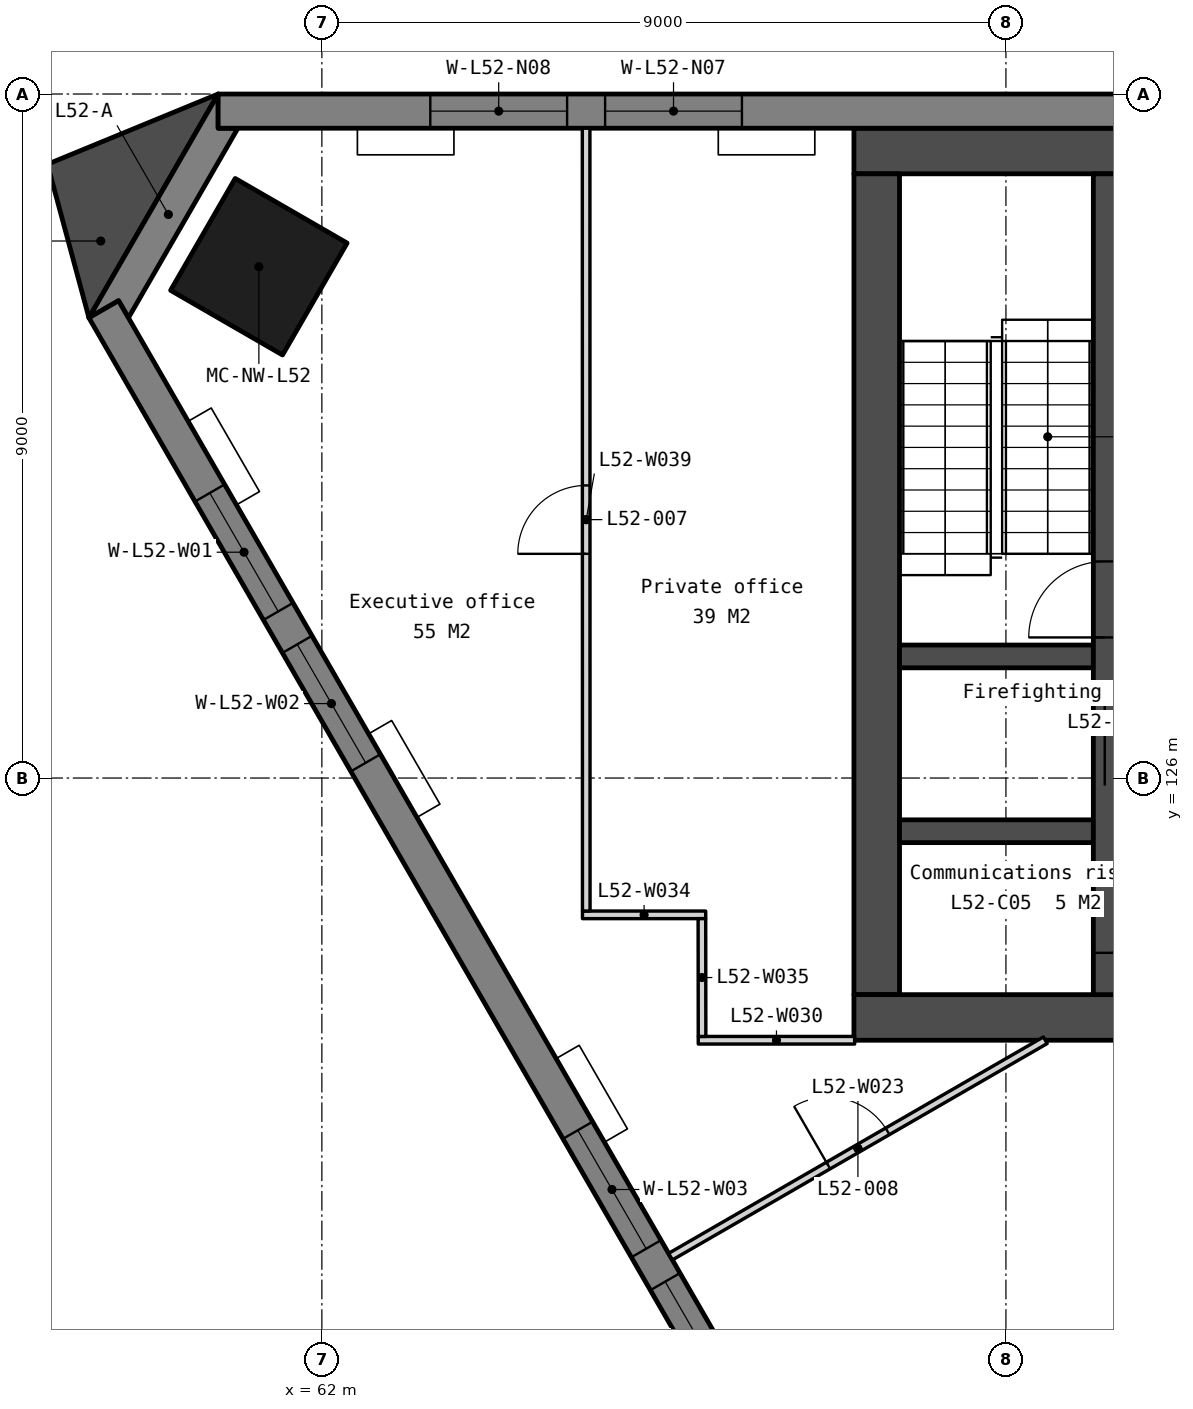
"""IFC4 building model, lengths in metres.
Left out: names, types, materials, properties, quantities, classifications, styles, units other than length and angle.
Written with IfcOpenShell. Run it as: python <this file> out.ifc"""

import sys

from ifc_helpers import new_model, si_unit, direction, frame, frame_2d, origin, origin_2d, place, context, subcontext, project, spatial, polyline, rectangle, outline, extrude, element, fill, save


model = new_model("IFC4")
c1 = context("Model", 3, precision=1e-05, world=origin(), true_north=direction((0.0, 1.0)))
c2 = subcontext(c1, "Body", "Model", "MODEL_VIEW")
j1 = project(units=[si_unit("LENGTHUNIT", "METRE"), si_unit("PLANEANGLEUNIT", "RADIAN")], contexts=[c1])
p1 = place(None, origin())
s1 = spatial("IfcSite", under=j1, at=p1, CompositionType="ELEMENT")
p2 = place(p1, origin())
s2 = spatial("IfcBuilding", under=s1, at=p2, CompositionType="ELEMENT")
p3 = place(p2, frame((0.0, 0.0, 207.5)))
s3 = spatial("IfcBuildingStorey", under=s2, at=p3, CompositionType="ELEMENT", Elevation=207.5)
p4 = place(p3, frame((61.171, 132.728, 0.0), z_axis=(0.0, 0.0, 1.0), x_axis=(-0.5, -0.866025403784, 0.0)))
e1 = element("IfcColumn", 1, at=p4, inside=s3, PredefinedType="COLUMN", context=c2, shape_type="SweptSolid", body=[
    extrude(rectangle(XDim=1.7, YDim=1.7, at=origin_2d()), origin(), (0.0, 0.0, 1.0), 3.9),
])
p5 = place(p3, frame((69.0, 134.25, 0.0), z_axis=(0.0, 0.0, 1.0), x_axis=(1.0, 0.0, 0.0)))
e2 = element("IfcWall", 2, at=p5, inside=s3, PredefinedType="SOLIDWALL", context=c2, shape_type="SweptSolid", body=[
    extrude(rectangle(XDim=22.0, YDim=0.6, at=frame_2d((11.0, 0.0))), origin(), (0.0, 0.0, 1.0), 3.75),
])
p6 = place(p3, frame((69.3, 133.95, 0.0), z_axis=(0.0, 0.0, 1.0), x_axis=(0.0, -1.0, 0.0)))
e3 = element("IfcWall", 3, at=p6, inside=s3, PredefinedType="SOLIDWALL", context=c2, shape_type="SweptSolid", body=[
    extrude(rectangle(XDim=10.8, YDim=0.6, at=frame_2d((5.4, 0.0))), origin(), (0.0, 0.0, 1.0), 3.75),
])
p7 = place(p3, frame((69.0, 122.85, 0.0), z_axis=(0.0, 0.0, 1.0), x_axis=(1.0, 0.0, 0.0)))
e4 = element("IfcWall", 4, at=p7, inside=s3, PredefinedType="SOLIDWALL", context=c2, shape_type="SweptSolid", body=[
    extrude(rectangle(XDim=22.0, YDim=0.6, at=frame_2d((11.0, 0.0))), origin(), (0.0, 0.0, 1.0), 3.75),
])
p8 = place(p7, frame((16.375, 0.0, 0.0)))
e5 = element("IfcOpeningElement", 5, at=p8, cuts=e4, PredefinedType="OPENING", context=c2, shape_type="SweptSolid", body=[
    extrude(rectangle(XDim=1.8, YDim=2.1, at=frame_2d((0.9, 1.05))), frame((0.0, 0.31, 0.0), z_axis=(0.0, -1.0, 0.0), x_axis=(1.0, 0.0, 0.0)), (0.0, 0.0, 1.0), 0.62),
])
p9 = place(p7, frame((3.825, 0.0, 0.0)))
e6 = element("IfcOpeningElement", 6, at=p9, cuts=e4, PredefinedType="OPENING", context=c2, shape_type="SweptSolid", body=[
    extrude(rectangle(XDim=1.8, YDim=2.1, at=frame_2d((0.9, 1.05))), frame((0.0, 0.31, 0.0), z_axis=(0.0, -1.0, 0.0), x_axis=(1.0, 0.0, 0.0)), (0.0, 0.0, 1.0), 0.62),
])
p10 = place(p7, frame((12.85, 0.0, 0.0)))
e7 = element("IfcOpeningElement", 7, at=p10, cuts=e4, PredefinedType="OPENING", context=c2, shape_type="SweptSolid", body=[
    extrude(rectangle(XDim=1.5, YDim=2.1, at=frame_2d((0.75, 1.05))), frame((0.0, 0.31, 0.0), z_axis=(0.0, -1.0, 0.0), x_axis=(1.0, 0.0, 0.0)), (0.0, 0.0, 1.0), 0.62),
])
for number, where, z_axis, x_axis in (
    (8, (69.6, 127.6, 0.0), (0.0, 0.0, 1.0), (1.0, 0.0, 0.0)),
    (9, (69.6, 125.3, 0.0), (0.0, 0.0, 1.0), (1.0, 0.0, 0.0)),
):
    element("IfcWall", number, at=place(p3, frame(where, z_axis=z_axis, x_axis=x_axis)), inside=s3, PredefinedType="SOLIDWALL", context=c2, shape_type="SweptSolid", body=[
        extrude(rectangle(XDim=2.55, YDim=0.3, at=frame_2d((1.275, 0.0))), origin(), (0.0, 0.0, 1.0), 3.75),
    ])
p11 = place(p3, frame((72.3, 133.95, 0.0), z_axis=(0.0, 0.0, 1.0), x_axis=(0.0, -1.0, 0.0)))
e10 = element("IfcWall", 10, at=p11, inside=s3, PredefinedType="SOLIDWALL", context=c2, shape_type="SweptSolid", body=[
    extrude(rectangle(XDim=10.8, YDim=0.3, at=frame_2d((5.4, 0.0))), origin(), (0.0, 0.0, 1.0), 3.75),
])
p12 = place(p11, frame((6.95, 0.0, 0.0)))
e11 = element("IfcOpeningElement", 11, at=p12, cuts=e10, PredefinedType="OPENING", context=c2, shape_type="SweptSolid", body=[
    extrude(rectangle(XDim=1.1, YDim=2.1, at=frame_2d((0.55, 1.05))), frame((0.0, 0.16, 0.0), z_axis=(0.0, -1.0, 0.0), x_axis=(1.0, 0.0, 0.0)), (0.0, 0.0, 1.0), 0.32),
])
p13 = place(p11, frame((9.35, 0.0, 0.0)))
e12 = element("IfcOpeningElement", 12, at=p13, cuts=e10, PredefinedType="OPENING", context=c2, shape_type="SweptSolid", body=[
    extrude(rectangle(XDim=0.9, YDim=2.1, at=frame_2d((0.45, 1.05))), frame((0.0, 0.16, 0.0), z_axis=(0.0, -1.0, 0.0), x_axis=(1.0, 0.0, 0.0)), (0.0, 0.0, 1.0), 0.32),
])
p14 = place(p11, frame((5.1, 0.0, 0.0)))
e13 = element("IfcOpeningElement", 13, at=p14, cuts=e10, PredefinedType="OPENING", context=c2, shape_type="SweptSolid", body=[
    extrude(rectangle(XDim=1.0, YDim=2.1, at=frame_2d((0.5, 1.05))), frame((0.0, 0.16, 0.0), z_axis=(0.0, -1.0, 0.0), x_axis=(1.0, 0.0, 0.0)), (0.0, 0.0, 1.0), 0.32),
])
p15 = place(p3, frame((0.0, 0.0, -0.15)))
e14 = element("IfcWall", 14, at=p15, inside=s3, PredefinedType="SOLIDWALL", context=c2, shape_type="SweptSolid", body=[
    extrude(outline(polyline([(60.635, 135.0), (60.635, 134.55), (60.895, 134.55), (59.455, 132.055), (59.325, 132.281), (58.935, 132.055), (60.635, 135.0)])), origin(), (0.0, 0.0, 1.0), 3.9),
])
p16 = place(p3, frame((99.365, 134.775, -0.15), z_axis=(0.0, 0.0, 1.0), x_axis=(-1.0, 0.0, 0.0)))
e15 = element("IfcWall", 15, at=p16, inside=s3, PredefinedType="SOLIDWALL", context=c2, shape_type="SweptSolid", body=[
    extrude(outline(polyline([(38.729, 0.0), (38.729, 3.9), (0.0, 3.9), (0.0, 0.0), (38.729, 0.0)])), frame((0.0, 0.225, 0.0), z_axis=(0.0, -1.0, 0.0), x_axis=(1.0, 0.0, 0.0)), (0.0, 0.0, 1.0), 0.45),
])
p17 = place(p16, frame((2.791, 0.0, 0.95)))
e16 = element("IfcOpeningElement", 16, at=p17, cuts=e15, PredefinedType="OPENING", context=c2, shape_type="SweptSolid", body=[
    extrude(rectangle(XDim=1.8, YDim=2.2, at=frame_2d((0.9, 1.1))), frame((0.0, 0.235, 0.0), z_axis=(0.0, -1.0, 0.0), x_axis=(1.0, 0.0, 0.0)), (0.0, 0.0, 1.0), 0.47),
])
p18 = place(p16, frame((5.091, 0.0, 0.95)))
e17 = element("IfcOpeningElement", 17, at=p18, cuts=e15, PredefinedType="OPENING", context=c2, shape_type="SweptSolid", body=[
    extrude(rectangle(XDim=1.8, YDim=2.2, at=frame_2d((0.9, 1.1))), frame((0.0, 0.235, 0.0), z_axis=(0.0, -1.0, 0.0), x_axis=(1.0, 0.0, 0.0)), (0.0, 0.0, 1.0), 0.47),
])
p19 = place(p16, frame((12.473, 0.0, 0.95)))
e18 = element("IfcOpeningElement", 18, at=p19, cuts=e15, PredefinedType="OPENING", context=c2, shape_type="SweptSolid", body=[
    extrude(rectangle(XDim=1.8, YDim=2.2, at=frame_2d((0.9, 1.1))), frame((0.0, 0.235, 0.0), z_axis=(0.0, -1.0, 0.0), x_axis=(1.0, 0.0, 0.0)), (0.0, 0.0, 1.0), 0.47),
])
p20 = place(p16, frame((14.773, 0.0, 0.95)))
e19 = element("IfcOpeningElement", 19, at=p20, cuts=e15, PredefinedType="OPENING", context=c2, shape_type="SweptSolid", body=[
    extrude(rectangle(XDim=1.8, YDim=2.2, at=frame_2d((0.9, 1.1))), frame((0.0, 0.235, 0.0), z_axis=(0.0, -1.0, 0.0), x_axis=(1.0, 0.0, 0.0)), (0.0, 0.0, 1.0), 0.47),
])
p21 = place(p16, frame((22.156, 0.0, 0.95)))
e20 = element("IfcOpeningElement", 20, at=p21, cuts=e15, PredefinedType="OPENING", context=c2, shape_type="SweptSolid", body=[
    extrude(rectangle(XDim=1.8, YDim=2.2, at=frame_2d((0.9, 1.1))), frame((0.0, 0.235, 0.0), z_axis=(0.0, -1.0, 0.0), x_axis=(1.0, 0.0, 0.0)), (0.0, 0.0, 1.0), 0.47),
])
p22 = place(p16, frame((24.456, 0.0, 0.95)))
e21 = element("IfcOpeningElement", 21, at=p22, cuts=e15, PredefinedType="OPENING", context=c2, shape_type="SweptSolid", body=[
    extrude(rectangle(XDim=1.8, YDim=2.2, at=frame_2d((0.9, 1.1))), frame((0.0, 0.235, 0.0), z_axis=(0.0, -1.0, 0.0), x_axis=(1.0, 0.0, 0.0)), (0.0, 0.0, 1.0), 0.47),
])
p23 = place(p16, frame((31.838, 0.0, 0.95)))
e22 = element("IfcOpeningElement", 22, at=p23, cuts=e15, PredefinedType="OPENING", context=c2, shape_type="SweptSolid", body=[
    extrude(rectangle(XDim=1.8, YDim=2.2, at=frame_2d((0.9, 1.1))), frame((0.0, 0.235, 0.0), z_axis=(0.0, -1.0, 0.0), x_axis=(1.0, 0.0, 0.0)), (0.0, 0.0, 1.0), 0.47),
])
p24 = place(p16, frame((34.138, 0.0, 0.95)))
e23 = element("IfcOpeningElement", 23, at=p24, cuts=e15, PredefinedType="OPENING", context=c2, shape_type="SweptSolid", body=[
    extrude(rectangle(XDim=1.8, YDim=2.2, at=frame_2d((0.9, 1.1))), frame((0.0, 0.235, 0.0), z_axis=(0.0, -1.0, 0.0), x_axis=(1.0, 0.0, 0.0)), (0.0, 0.0, 1.0), 0.47),
])
p25 = place(p3, frame((59.13, 132.168, -0.15), z_axis=(0.0, 0.0, 1.0), x_axis=(0.500002199942, -0.866024133644, 0.0)))
e24 = element("IfcWall", 24, at=p25, inside=s3, PredefinedType="SOLIDWALL", context=c2, shape_type="SweptSolid", body=[
    extrude(outline(polyline([(38.729, 0.0), (38.729, 3.9), (0.0, 3.9), (0.0, 0.0), (38.729, 0.0)])), frame((0.0, 0.225, 0.0), z_axis=(0.0, -1.0, 0.0), x_axis=(1.0, 0.0, 0.0)), (0.0, 0.0, 1.0), 0.45),
])
p26 = place(p25, frame((2.791, 0.0, 0.95)))
e25 = element("IfcOpeningElement", 25, at=p26, cuts=e24, PredefinedType="OPENING", context=c2, shape_type="SweptSolid", body=[
    extrude(rectangle(XDim=1.8, YDim=2.2, at=frame_2d((0.9, 1.1))), frame((0.0, 0.235, 0.0), z_axis=(0.0, -1.0, 0.0), x_axis=(1.0, 0.0, 0.0)), (0.0, 0.0, 1.0), 0.47),
])
p27 = place(p25, frame((5.091, 0.0, 0.95)))
e26 = element("IfcOpeningElement", 26, at=p27, cuts=e24, PredefinedType="OPENING", context=c2, shape_type="SweptSolid", body=[
    extrude(rectangle(XDim=1.8, YDim=2.2, at=frame_2d((0.9, 1.1))), frame((0.0, 0.235, 0.0), z_axis=(0.0, -1.0, 0.0), x_axis=(1.0, 0.0, 0.0)), (0.0, 0.0, 1.0), 0.47),
])
p28 = place(p25, frame((12.473, 0.0, 0.95)))
e27 = element("IfcOpeningElement", 27, at=p28, cuts=e24, PredefinedType="OPENING", context=c2, shape_type="SweptSolid", body=[
    extrude(rectangle(XDim=1.8, YDim=2.2, at=frame_2d((0.9, 1.1))), frame((0.0, 0.235, 0.0), z_axis=(0.0, -1.0, 0.0), x_axis=(1.0, 0.0, 0.0)), (0.0, 0.0, 1.0), 0.47),
])
p29 = place(p25, frame((14.773, 0.0, 0.95)))
e28 = element("IfcOpeningElement", 28, at=p29, cuts=e24, PredefinedType="OPENING", context=c2, shape_type="SweptSolid", body=[
    extrude(rectangle(XDim=1.8, YDim=2.2, at=frame_2d((0.9, 1.1))), frame((0.0, 0.235, 0.0), z_axis=(0.0, -1.0, 0.0), x_axis=(1.0, 0.0, 0.0)), (0.0, 0.0, 1.0), 0.47),
])
p30 = place(p25, frame((22.156, 0.0, 0.95)))
e29 = element("IfcOpeningElement", 29, at=p30, cuts=e24, PredefinedType="OPENING", context=c2, shape_type="SweptSolid", body=[
    extrude(rectangle(XDim=1.8, YDim=2.2, at=frame_2d((0.9, 1.1))), frame((0.0, 0.235, 0.0), z_axis=(0.0, -1.0, 0.0), x_axis=(1.0, 0.0, 0.0)), (0.0, 0.0, 1.0), 0.47),
])
p31 = place(p25, frame((24.456, 0.0, 0.95)))
e30 = element("IfcOpeningElement", 30, at=p31, cuts=e24, PredefinedType="OPENING", context=c2, shape_type="SweptSolid", body=[
    extrude(rectangle(XDim=1.8, YDim=2.2, at=frame_2d((0.9, 1.1))), frame((0.0, 0.235, 0.0), z_axis=(0.0, -1.0, 0.0), x_axis=(1.0, 0.0, 0.0)), (0.0, 0.0, 1.0), 0.47),
])
p32 = place(p25, frame((31.838, 0.0, 0.95)))
e31 = element("IfcOpeningElement", 31, at=p32, cuts=e24, PredefinedType="OPENING", context=c2, shape_type="SweptSolid", body=[
    extrude(rectangle(XDim=1.8, YDim=2.2, at=frame_2d((0.9, 1.1))), frame((0.0, 0.235, 0.0), z_axis=(0.0, -1.0, 0.0), x_axis=(1.0, 0.0, 0.0)), (0.0, 0.0, 1.0), 0.47),
])
p33 = place(p25, frame((34.138, 0.0, 0.95)))
e32 = element("IfcOpeningElement", 32, at=p33, cuts=e24, PredefinedType="OPENING", context=c2, shape_type="SweptSolid", body=[
    extrude(rectangle(XDim=1.8, YDim=2.2, at=frame_2d((0.9, 1.1))), frame((0.0, 0.235, 0.0), z_axis=(0.0, -1.0, 0.0), x_axis=(1.0, 0.0, 0.0)), (0.0, 0.0, 1.0), 0.47),
])
p34 = place(p3, frame((0.0, 0.0, -0.15)))
e33 = element("IfcWall", 33, at=p34, inside=s3, PredefinedType="SOLIDWALL", context=c2, shape_type="SweptSolid", body=[
    extrude(outline(polyline([(60.635, 135.0), (58.39, 134.076), (58.935, 132.055), (60.635, 135.0)])), origin(), (0.0, 0.0, 1.0), 3.9),
])
p35 = place(p3, frame((69.007, 115.51, 0.0), z_axis=(0.0, 0.0, 1.0), x_axis=(0.866033739143, 0.499985562458, 0.0)))
e34 = element("IfcWall", 34, at=p35, inside=s3, PredefinedType="PARTITIONING", context=c2, shape_type="SweptSolid", body=[
    extrude(rectangle(XDim=8.594, YDim=0.2, at=frame_2d((4.297, 0.0))), origin(), (0.0, 0.0, 1.0), 3.75),
])
p36 = place(p3, frame((66.587, 119.703, 0.0), z_axis=(0.0, 0.0, 1.0), x_axis=(0.866023511746, 0.500003277092, 0.0)))
e35 = element("IfcWall", 35, at=p36, inside=s3, PredefinedType="PARTITIONING", context=c2, shape_type="SweptSolid", body=[
    extrude(rectangle(XDim=5.694, YDim=0.1, at=frame_2d((2.847, 0.0))), origin(), (0.0, 0.0, 1.0), 3.75),
])
p37 = place(p36, frame((2.397, 0.0, 0.0)))
e36 = element("IfcOpeningElement", 36, at=p37, cuts=e35, PredefinedType="OPENING", context=c2, shape_type="SweptSolid", body=[
    extrude(rectangle(XDim=0.9, YDim=2.1, at=frame_2d((0.45, 1.05))), frame((0.0, 0.06, 0.0), z_axis=(0.0, -1.0, 0.0), x_axis=(1.0, 0.0, 0.0)), (0.0, 0.0, 1.0), 0.12),
])
p38 = place(p3, frame((66.952, 122.55, 0.0), z_axis=(0.0, 0.0, 1.0), x_axis=(1.0, 0.0, 0.0)))
e37 = element("IfcWall", 37, at=p38, inside=s3, PredefinedType="PARTITIONING", context=c2, shape_type="SweptSolid", body=[
    extrude(rectangle(XDim=2.058, YDim=0.1, at=frame_2d((1.029, 0.0))), origin(), (0.0, 0.0, 1.0), 3.75),
])
p39 = place(p3, frame((65.428, 124.2, 0.0), z_axis=(0.0, 0.0, 1.0), x_axis=(1.0, 0.0, 0.0)))
e38 = element("IfcWall", 38, at=p39, inside=s3, PredefinedType="PARTITIONING", context=c2, shape_type="SweptSolid", body=[
    extrude(rectangle(XDim=1.622, YDim=0.1, at=frame_2d((0.811, 0.0))), origin(), (0.0, 0.0, 1.0), 3.28),
])
p40 = place(p3, frame((67.002, 122.6, 0.0), z_axis=(0.0, 0.0, 1.0), x_axis=(-0.001260238445, 0.999999205899, 0.0)))
e39 = element("IfcWall", 39, at=p40, inside=s3, PredefinedType="PARTITIONING", context=c2, shape_type="SweptSolid", body=[
    extrude(rectangle(XDim=1.55, YDim=0.1, at=frame_2d((0.775, 0.0))), origin(), (0.0, 0.0, 1.0), 3.75),
])
p41 = place(p3, frame((65.479, 124.25, 0.0), z_axis=(0.0, 0.0, 1.0), x_axis=(-0.000189622884, 0.999999982022, 0.0)))
e40 = element("IfcWall", 40, at=p41, inside=s3, PredefinedType="PARTITIONING", context=c2, shape_type="SweptSolid", body=[
    extrude(rectangle(XDim=10.3, YDim=0.1, at=frame_2d((5.15, 0.0))), origin(), (0.0, 0.0, 1.0), 3.75),
])
p42 = place(p41, frame((4.7, 0.0, 0.0)))
e41 = element("IfcOpeningElement", 41, at=p42, cuts=e40, PredefinedType="OPENING", context=c2, shape_type="SweptSolid", body=[
    extrude(rectangle(XDim=0.9, YDim=2.1, at=frame_2d((0.45, 1.05))), frame((0.0, 0.06, 0.0), z_axis=(0.0, -1.0, 0.0), x_axis=(1.0, 0.0, 0.0)), (0.0, 0.0, 1.0), 0.12),
])
p43 = place(p12, origin())
e42 = element("IfcDoor", 42, at=p43, inside=s3, OperationType="SLIDING_TO_LEFT", PredefinedType="DOOR", context=c2, shape_type="SweptSolid", body=[
    extrude(rectangle(XDim=1.1, YDim=2.1, at=frame_2d((0.55, 1.05))), frame((0.0, 0.025, 0.0), z_axis=(0.0, -1.0, 0.0), x_axis=(1.0, 0.0, 0.0)), (0.0, 0.0, 1.0), 0.05),
])
fill(e11, e42)
p44 = place(p13, origin())
e43 = element("IfcDoor", 43, at=p44, inside=s3, OperationType="SINGLE_SWING_LEFT", PredefinedType="DOOR", context=c2, shape_type="SweptSolid", body=[
    extrude(rectangle(XDim=0.9, YDim=2.1, at=frame_2d((0.45, 1.05))), frame((0.0, 0.025, 0.0), z_axis=(0.0, -1.0, 0.0), x_axis=(1.0, 0.0, 0.0)), (0.0, 0.0, 1.0), 0.05),
])
fill(e12, e43)
p45 = place(p14, origin())
e44 = element("IfcDoor", 44, at=p45, inside=s3, OperationType="SINGLE_SWING_RIGHT", PredefinedType="DOOR", context=c2, shape_type="SweptSolid", body=[
    extrude(rectangle(XDim=1.0, YDim=2.1, at=frame_2d((0.5, 1.05))), frame((0.0, 0.025, 0.0), z_axis=(0.0, -1.0, 0.0), x_axis=(1.0, 0.0, 0.0)), (0.0, 0.0, 1.0), 0.05),
])
fill(e13, e44)
p46 = place(p23, origin())
e45 = element("IfcWindow", 45, at=p46, inside=s3, PartitioningType="SINGLE_PANEL", PredefinedType="WINDOW", context=c2, shape_type="SweptSolid", body=[
    extrude(rectangle(XDim=1.8, YDim=2.2, at=frame_2d((0.9, 1.1))), frame((0.0, 0.03, 0.0), z_axis=(0.0, -1.0, 0.0), x_axis=(1.0, 0.0, 0.0)), (0.0, 0.0, 1.0), 0.06),
])
fill(e22, e45)
p47 = place(p24, origin())
e46 = element("IfcWindow", 46, at=p47, inside=s3, PartitioningType="SINGLE_PANEL", PredefinedType="WINDOW", context=c2, shape_type="SweptSolid", body=[
    extrude(rectangle(XDim=1.8, YDim=2.2, at=frame_2d((0.9, 1.1))), frame((0.0, 0.03, 0.0), z_axis=(0.0, -1.0, 0.0), x_axis=(1.0, 0.0, 0.0)), (0.0, 0.0, 1.0), 0.06),
])
fill(e23, e46)
p48 = place(p26, origin())
e47 = element("IfcWindow", 47, at=p48, inside=s3, PartitioningType="SINGLE_PANEL", PredefinedType="WINDOW", context=c2, shape_type="SweptSolid", body=[
    extrude(rectangle(XDim=1.8, YDim=2.2, at=frame_2d((0.9, 1.1))), frame((0.0, 0.03, 0.0), z_axis=(0.0, -1.0, 0.0), x_axis=(1.0, 0.0, 0.0)), (0.0, 0.0, 1.0), 0.06),
])
fill(e25, e47)
p49 = place(p27, origin())
e48 = element("IfcWindow", 48, at=p49, inside=s3, PartitioningType="SINGLE_PANEL", PredefinedType="WINDOW", context=c2, shape_type="SweptSolid", body=[
    extrude(rectangle(XDim=1.8, YDim=2.2, at=frame_2d((0.9, 1.1))), frame((0.0, 0.03, 0.0), z_axis=(0.0, -1.0, 0.0), x_axis=(1.0, 0.0, 0.0)), (0.0, 0.0, 1.0), 0.06),
])
fill(e26, e48)
p50 = place(p28, origin())
e49 = element("IfcWindow", 49, at=p50, inside=s3, PartitioningType="SINGLE_PANEL", PredefinedType="WINDOW", context=c2, shape_type="SweptSolid", body=[
    extrude(rectangle(XDim=1.8, YDim=2.2, at=frame_2d((0.9, 1.1))), frame((0.0, 0.03, 0.0), z_axis=(0.0, -1.0, 0.0), x_axis=(1.0, 0.0, 0.0)), (0.0, 0.0, 1.0), 0.06),
])
fill(e27, e49)
p51 = place(p29, origin())
e50 = element("IfcWindow", 50, at=p51, inside=s3, PartitioningType="SINGLE_PANEL", PredefinedType="WINDOW", context=c2, shape_type="SweptSolid", body=[
    extrude(rectangle(XDim=1.8, YDim=2.2, at=frame_2d((0.9, 1.1))), frame((0.0, 0.03, 0.0), z_axis=(0.0, -1.0, 0.0), x_axis=(1.0, 0.0, 0.0)), (0.0, 0.0, 1.0), 0.06),
])
fill(e28, e50)
p52 = place(p42, origin())
e51 = element("IfcDoor", 51, at=p52, inside=s3, OperationType="SINGLE_SWING_LEFT", PredefinedType="DOOR", context=c2, shape_type="SweptSolid", body=[
    extrude(rectangle(XDim=0.9, YDim=2.1, at=frame_2d((0.45, 1.05))), frame((0.0, 0.025, 0.0), z_axis=(0.0, -1.0, 0.0), x_axis=(1.0, 0.0, 0.0)), (0.0, 0.0, 1.0), 0.05),
])
fill(e41, e51)
p53 = place(p37, origin())
e52 = element("IfcDoor", 52, at=p53, inside=s3, OperationType="SINGLE_SWING_LEFT", PredefinedType="DOOR", context=c2, shape_type="SweptSolid", body=[
    extrude(rectangle(XDim=0.9, YDim=2.1, at=frame_2d((0.45, 1.05))), frame((0.0, 0.025, 0.0), z_axis=(0.0, -1.0, 0.0), x_axis=(1.0, 0.0, 0.0)), (0.0, 0.0, 1.0), 0.05),
])
fill(e36, e52)
save(model, sys.argv[1])
